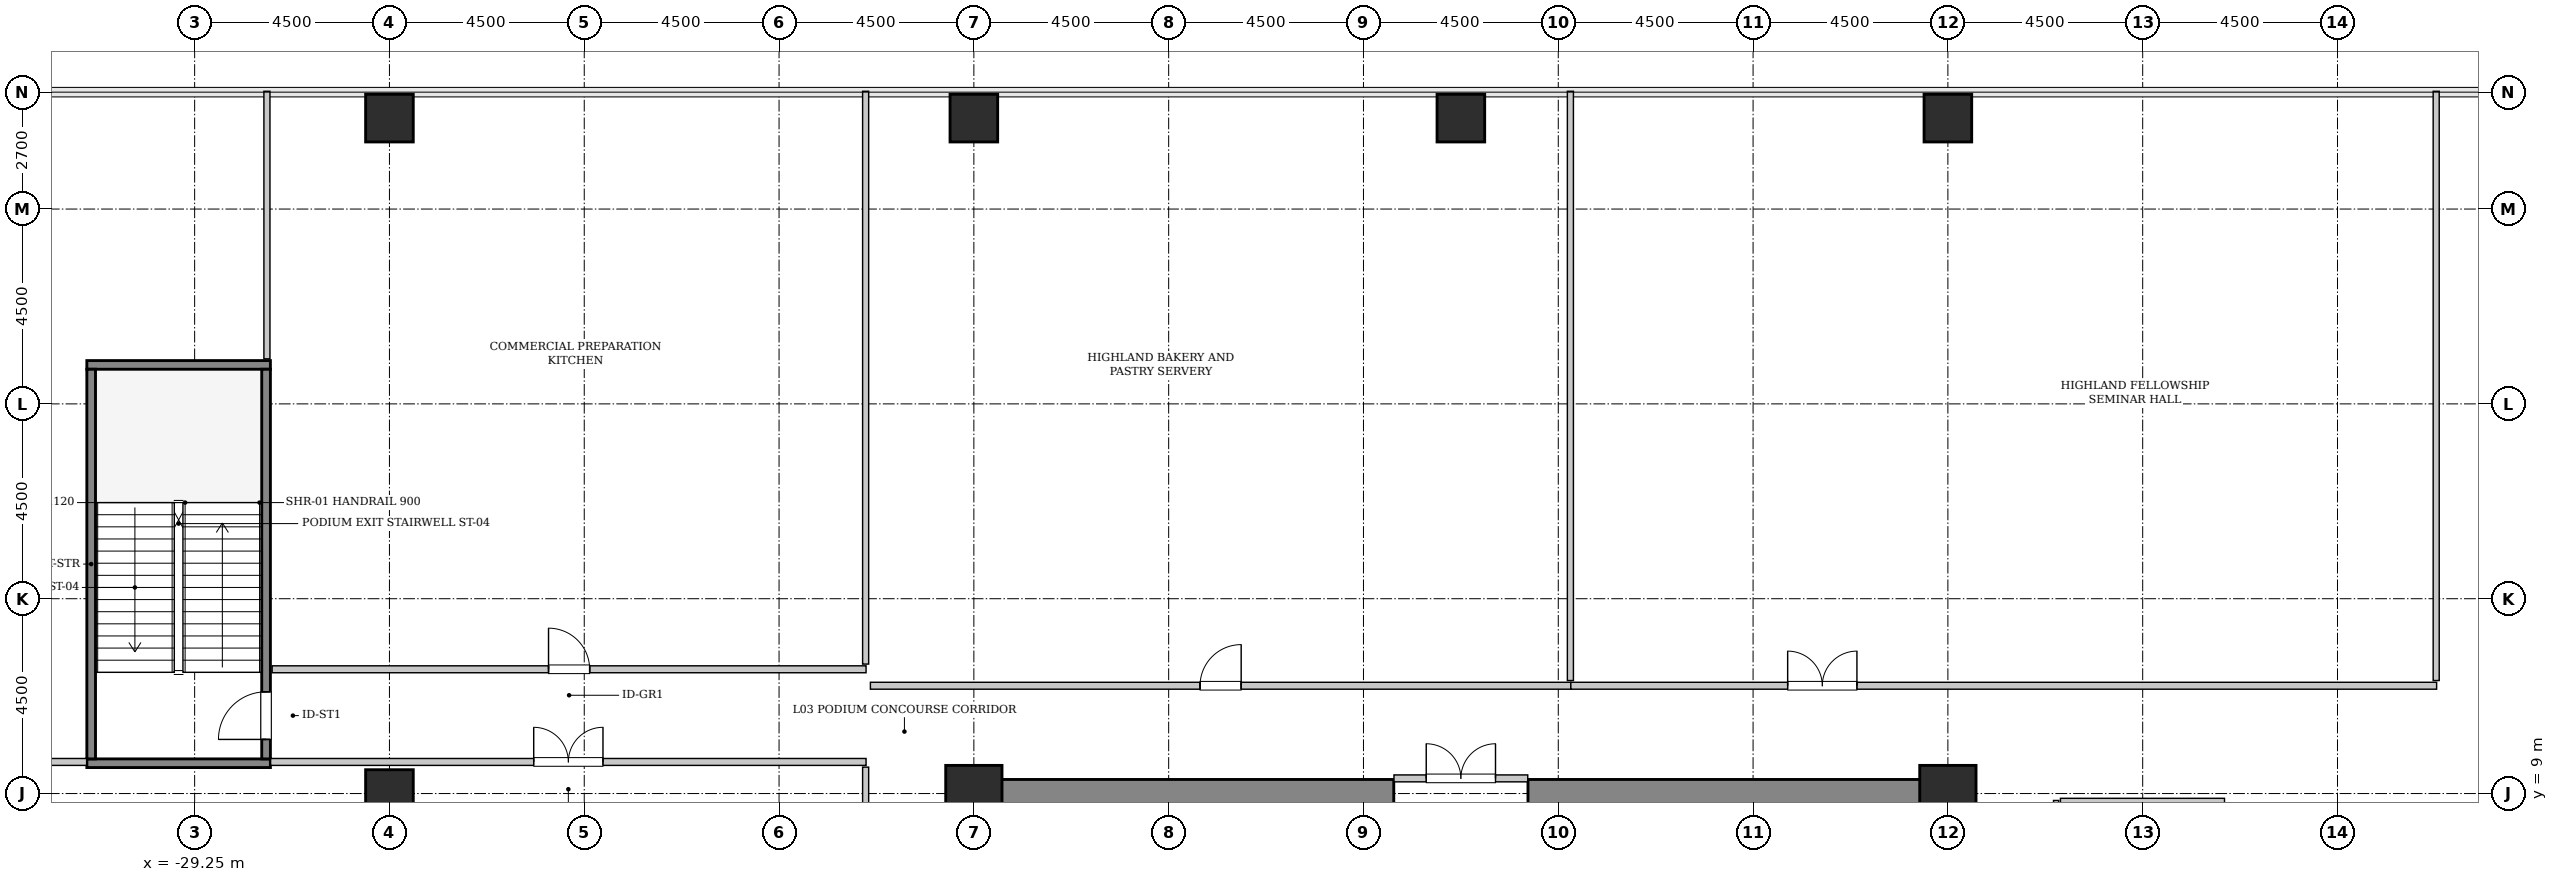
"""IFC4 building model, lengths in metres.
Left out: names, types, materials, properties, quantities, classifications, styles, units other than length and angle.
Written with IfcOpenShell. Run it as: python <this file> out.ifc"""

import sys

from ifc_helpers import new_model, si_unit, direction, frame, frame_2d, origin, origin_2d, place, context, subcontext, project, spatial, rectangle, hollow_rectangle, extrude, source, transform, mapped, element, fill, save


model = new_model("IFC4")
c1 = context("Model", 3, precision=1e-05, world=origin(), true_north=direction((0.0, 1.0)))
c2 = subcontext(c1, "Body", "Model", "MODEL_VIEW")
j1 = project(units=[si_unit("LENGTHUNIT", "METRE"), si_unit("PLANEANGLEUNIT", "RADIAN")], contexts=[c1])
p1 = place(None, origin())
s1 = spatial("IfcSite", under=j1, at=p1, CompositionType="ELEMENT")
p2 = place(p1, origin())
s2 = spatial("IfcBuilding", under=s1, at=p2, CompositionType="ELEMENT")
p3 = place(p2, frame((0.0, 0.0, 16.8)))
s3 = spatial("IfcBuildingStorey", under=s2, at=p3, CompositionType="ELEMENT", Elevation=16.8)
m1 = source(origin(), c2, "Body", "SweptSolid", [
    extrude(rectangle(XDim=10.025, YDim=0.65, at=frame_2d((5.012, 0.0))), origin(), (0.0, 0.0, 1.0), 5.4),
])
for number, where, z_axis, x_axis in (
    (1, (-11.575, 9.0, 0.0), (0.0, 0.0, 1.0), (1.0, 0.0, 0.0)),
    (2, (1.55, 9.0, 0.0), (0.0, 0.0, 1.0), (1.0, 0.0, 0.0)),
):
    element("IfcWall", number, at=place(p3, frame(where, z_axis=z_axis, x_axis=x_axis)), inside=s3, PredefinedType="SHEAR", context=c2, shape_type="MappedRepresentation", body=[
        mapped(m1, transform((0.0, 0.0, 0.0), x_axis=(1.0, 0.0, 0.0), y_axis=(0.0, 1.0, 0.0), z_axis=(0.0, 0.0, 1.0), scale=1.0)),
    ])
m2 = source(origin(), c2, "Body", "SweptSolid", [
    extrude(hollow_rectangle(XDim=1.1, YDim=1.1, WallThickness=0.055, InnerFilletRadius=0.055, OuterFilletRadius=0.11, at=origin_2d()), origin(), (0.0, 0.0, 1.0), 5.4),
])
p4 = place(p3, frame((-24.75, 9.0, 0.0), z_axis=(0.0, 0.0, 1.0), x_axis=(1.0, 0.0, 0.0)))
e3 = element("IfcColumn", 3, at=p4, inside=s3, PredefinedType="COLUMN", context=c2, shape_type="MappedRepresentation", body=[
    mapped(m2, transform((0.0, 0.0, 0.0), x_axis=(1.0, 0.0, 0.0), y_axis=(0.0, 1.0, 0.0), z_axis=(0.0, 0.0, 1.0), scale=1.0)),
])
m3 = source(origin(), c2, "Body", "SweptSolid", [
    extrude(hollow_rectangle(XDim=1.1, YDim=1.1, WallThickness=0.055, InnerFilletRadius=0.055, OuterFilletRadius=0.11, at=origin_2d()), origin(), (0.0, 0.0, 1.0), 5.4),
])
p5 = place(p3, frame((-24.75, 24.6, 0.0), z_axis=(0.0, 0.0, 1.0), x_axis=(1.0, 0.0, 0.0)))
e4 = element("IfcColumn", 4, at=p5, inside=s3, PredefinedType="COLUMN", context=c2, shape_type="MappedRepresentation", body=[
    mapped(m3, transform((0.0, 0.0, 0.0), x_axis=(1.0, 0.0, 0.0), y_axis=(0.0, 1.0, 0.0), z_axis=(0.0, 0.0, 1.0), scale=1.0)),
])
m4 = source(origin(), c2, "Body", "SweptSolid", [
    extrude(hollow_rectangle(XDim=1.3, YDim=1.3, WallThickness=0.065, InnerFilletRadius=0.065, OuterFilletRadius=0.13, at=origin_2d()), origin(), (0.0, 0.0, 1.0), 5.4),
])
p6 = place(p3, frame((-11.25, 9.0, 0.0), z_axis=(0.0, 0.0, 1.0), x_axis=(1.0, 0.0, 0.0)))
e5 = element("IfcColumn", 5, at=p6, inside=s3, PredefinedType="COLUMN", context=c2, shape_type="MappedRepresentation", body=[
    mapped(m4, transform((0.0, 0.0, 0.0), x_axis=(1.0, 0.0, 0.0), y_axis=(0.0, 1.0, 0.0), z_axis=(0.0, 0.0, 1.0), scale=1.0)),
])
for number, where, z_axis, x_axis in (
    (6, (-11.25, 24.6, 0.0), (0.0, 0.0, 1.0), (1.0, 0.0, 0.0)),
    (7, (0.0, 24.6, 0.0), (0.0, 0.0, 1.0), (1.0, 0.0, 0.0)),
):
    element("IfcColumn", number, at=place(p3, frame(where, z_axis=z_axis, x_axis=x_axis)), inside=s3, PredefinedType="COLUMN", context=c2, shape_type="MappedRepresentation", body=[
        mapped(m3, transform((0.0, 0.0, 0.0), x_axis=(1.0, 0.0, 0.0), y_axis=(0.0, 1.0, 0.0), z_axis=(0.0, 0.0, 1.0), scale=1.0)),
    ])
p7 = place(p3, frame((11.25, 9.0, 0.0), z_axis=(0.0, 0.0, 1.0), x_axis=(1.0, 0.0, 0.0)))
e8 = element("IfcColumn", 8, at=p7, inside=s3, PredefinedType="COLUMN", context=c2, shape_type="MappedRepresentation", body=[
    mapped(m4, transform((0.0, 0.0, 0.0), x_axis=(1.0, 0.0, 0.0), y_axis=(0.0, 1.0, 0.0), z_axis=(0.0, 0.0, 1.0), scale=1.0)),
])
p8 = place(p3, frame((11.25, 24.6, 0.0), z_axis=(0.0, 0.0, 1.0), x_axis=(1.0, 0.0, 0.0)))
e9 = element("IfcColumn", 9, at=p8, inside=s3, PredefinedType="COLUMN", context=c2, shape_type="MappedRepresentation", body=[
    mapped(m3, transform((0.0, 0.0, 0.0), x_axis=(1.0, 0.0, 0.0), y_axis=(0.0, 1.0, 0.0), z_axis=(0.0, 0.0, 1.0), scale=1.0)),
])
m5 = source(origin(), c2, "Body", "SweptSolid", [
    extrude(rectangle(XDim=4.24, YDim=0.2, at=frame_2d((2.12, 0.0))), origin(), (0.0, 0.0, 1.0), 5.4),
])
for number, where, z_axis, x_axis in (
    (10, (-27.5, 9.7, 0.0), (0.0, 0.0, 1.0), (-1.0, 0.0, 0.0)),
    (11, (-27.5, 18.9, 0.0), (0.0, 0.0, 1.0), (-1.0, 0.0, 0.0)),
):
    element("IfcWall", number, at=place(p3, frame(where, z_axis=z_axis, x_axis=x_axis)), inside=s3, PredefinedType="SOLIDWALL", context=c2, shape_type="MappedRepresentation", body=[
        mapped(m5, transform((0.0, 0.0, 0.0), x_axis=(1.0, 0.0, 0.0), y_axis=(0.0, 1.0, 0.0), z_axis=(0.0, 0.0, 1.0), scale=1.0)),
    ])
m6 = source(origin(), c2, "Body", "SweptSolid", [
    extrude(rectangle(XDim=9.0, YDim=0.2, at=frame_2d((4.5, 0.0))), origin(), (0.0, 0.0, 1.0), 5.4),
])
p9 = place(p3, frame((-27.6, 9.8, 0.0), z_axis=(0.0, 0.0, 1.0), x_axis=(0.0, 1.0, 0.0)))
e12 = element("IfcWall", 12, at=p9, inside=s3, PredefinedType="SOLIDWALL", context=c2, shape_type="MappedRepresentation", body=[
    mapped(m6, transform((0.0, 0.0, 0.0), x_axis=(1.0, 0.0, 0.0), y_axis=(0.0, 1.0, 0.0), z_axis=(0.0, 0.0, 1.0), scale=1.0)),
])
p10 = place(p9, frame((0.45, 0.0, 0.0)))
e13 = element("IfcOpeningElement", 13, at=p10, cuts=e12, PredefinedType="OPENING", context=c2, shape_type="SweptSolid", body=[
    extrude(rectangle(XDim=1.1, YDim=2.15, at=frame_2d((0.55, 1.075))), frame((0.0, 0.11, 0.0), z_axis=(0.0, -1.0, 0.0), x_axis=(1.0, 0.0, 0.0)), (0.0, 0.0, 1.0), 0.22),
])
p11 = place(p3, frame((-31.64, 9.8, 0.0), z_axis=(0.0, 0.0, 1.0), x_axis=(0.0, 1.0, 0.0)))
e14 = element("IfcWall", 14, at=p11, inside=s3, PredefinedType="SOLIDWALL", context=c2, shape_type="MappedRepresentation", body=[
    mapped(m6, transform((0.0, 0.0, 0.0), x_axis=(1.0, 0.0, 0.0), y_axis=(0.0, 1.0, 0.0), z_axis=(0.0, 0.0, 1.0), scale=1.0)),
])
m7 = source(origin(), c2, "Body", "SweptSolid", [
    extrude(rectangle(XDim=3.09, YDim=0.16, at=frame_2d((1.545, 0.0))), origin(), (0.0, 0.0, 1.0), 3.975),
])
p12 = place(p3, frame((-1.545, 9.35, 0.0), z_axis=(0.0, 0.0, 1.0), x_axis=(1.0, 0.0, 0.0)))
e15 = element("IfcWall", 15, at=p12, inside=s3, PredefinedType="PARTITIONING", context=c2, shape_type="MappedRepresentation", body=[
    mapped(m7, transform((0.0, 0.0, 0.0), x_axis=(1.0, 0.0, 0.0), y_axis=(0.0, 1.0, 0.0), z_axis=(0.0, 0.0, 1.0), scale=1.0)),
])
p13 = place(p12, frame((0.745, 0.0, 0.0)))
e16 = element("IfcOpeningElement", 16, at=p13, cuts=e15, PredefinedType="OPENING", context=c2, shape_type="SweptSolid", body=[
    extrude(rectangle(XDim=1.6, YDim=2.3, at=frame_2d((0.8, 1.15))), frame((0.0, 0.09, 0.0), z_axis=(0.0, -1.0, 0.0), x_axis=(1.0, 0.0, 0.0)), (0.0, 0.0, 1.0), 0.18),
])
m8 = source(origin(), c2, "Body", "SweptSolid", [
    extrude(rectangle(XDim=3.68, YDim=0.12, at=frame_2d((1.84, 0.0))), origin(), (0.0, 0.0, 1.0), 5.085),
])
p14 = place(p3, frame((13.75, 5.16, 0.0), z_axis=(0.0, 0.0, 1.0), x_axis=(0.0, 1.0, 0.0)))
e17 = element("IfcWall", 17, at=p14, inside=s3, PredefinedType="PLUMBINGWALL", context=c2, shape_type="MappedRepresentation", body=[
    mapped(m8, transform((0.0, 0.0, 0.0), x_axis=(1.0, 0.0, 0.0), y_axis=(0.0, 1.0, 0.0), z_axis=(0.0, 0.0, 1.0), scale=1.0)),
])
p15 = place(p14, frame((1.415, 0.0, 0.0)))
e18 = element("IfcOpeningElement", 18, at=p15, cuts=e17, PredefinedType="OPENING", context=c2, shape_type="SweptSolid", body=[
    extrude(rectangle(XDim=0.85, YDim=2.1, at=frame_2d((0.425, 1.05))), frame((0.0, 0.07, 0.0), z_axis=(0.0, -1.0, 0.0), x_axis=(1.0, 0.0, 0.0)), (0.0, 0.0, 1.0), 0.14),
])
m9 = source(origin(), c2, "Body", "SweptSolid", [
    extrude(rectangle(XDim=3.79, YDim=0.12, at=frame_2d((1.895, 0.0))), origin(), (0.0, 0.0, 1.0), 4.075),
])
p16 = place(p3, frame((13.85, 8.83, 0.0), z_axis=(0.0, 0.0, 1.0), x_axis=(1.0, 0.0, 0.0)))
e19 = element("IfcWall", 19, at=p16, inside=s3, PredefinedType="PLUMBINGWALL", context=c2, shape_type="MappedRepresentation", body=[
    mapped(m9, transform((0.0, 0.0, 0.0), x_axis=(1.0, 0.0, 0.0), y_axis=(0.0, 1.0, 0.0), z_axis=(0.0, 0.0, 1.0), scale=1.0)),
])
m10 = source(origin(), c2, "Body", "SweptSolid", [
    extrude(rectangle(XDim=13.755, YDim=0.16, at=frame_2d((6.877, 0.0))), origin(), (0.0, 0.0, 1.0), 5.085),
])
p17 = place(p3, frame((-27.495, 9.73, 0.0), z_axis=(0.0, 0.0, 1.0), x_axis=(1.0, 0.0, 0.0)))
e20 = element("IfcWall", 20, at=p17, inside=s3, PredefinedType="PARTITIONING", context=c2, shape_type="MappedRepresentation", body=[
    mapped(m10, transform((0.0, 0.0, 0.0), x_axis=(1.0, 0.0, 0.0), y_axis=(0.0, 1.0, 0.0), z_axis=(0.0, 0.0, 1.0), scale=1.0)),
])
p18 = place(p17, frame((6.077, 0.0, 0.0)))
e21 = element("IfcOpeningElement", 21, at=p18, cuts=e20, PredefinedType="OPENING", context=c2, shape_type="SweptSolid", body=[
    extrude(rectangle(XDim=1.6, YDim=2.3, at=frame_2d((0.8, 1.15))), frame((0.0, 0.09, 0.0), z_axis=(0.0, -1.0, 0.0), x_axis=(1.0, 0.0, 0.0)), (0.0, 0.0, 1.0), 0.18),
])
m11 = source(origin(), c2, "Body", "SweptSolid", [
    extrude(rectangle(XDim=6.525, YDim=0.16, at=frame_2d((3.262, 0.0))), origin(), (0.0, 0.0, 1.0), 5.085),
])
p19 = place(p3, frame((-38.27, 9.73, 0.0), z_axis=(0.0, 0.0, 1.0), x_axis=(1.0, 0.0, 0.0)))
e22 = element("IfcWall", 22, at=p19, inside=s3, PredefinedType="PARTITIONING", context=c2, shape_type="MappedRepresentation", body=[
    mapped(m11, transform((0.0, 0.0, 0.0), x_axis=(1.0, 0.0, 0.0), y_axis=(0.0, 1.0, 0.0), z_axis=(0.0, 0.0, 1.0), scale=1.0)),
])
m12 = source(origin(), c2, "Body", "SweptSolid", [
    extrude(rectangle(XDim=9.6, YDim=0.14, at=frame_2d((4.8, 0.0))), origin(), (0.0, 0.0, 1.0), 5.085),
])
p20 = place(p3, frame((-13.75, 0.01, 0.0), z_axis=(0.0, 0.0, 1.0), x_axis=(0.0, 1.0, 0.0)))
e23 = element("IfcWall", 23, at=p20, inside=s3, PredefinedType="PARTITIONING", context=c2, shape_type="MappedRepresentation", body=[
    mapped(m12, transform((0.0, 0.0, 0.0), x_axis=(1.0, 0.0, 0.0), y_axis=(0.0, 1.0, 0.0), z_axis=(0.0, 0.0, 1.0), scale=1.0)),
])
m13 = source(origin(), c2, "Body", "SweptSolid", [
    extrude(rectangle(XDim=13.72, YDim=0.16, at=frame_2d((6.86, 0.0))), origin(), (0.0, 0.0, 1.0), 5.085),
])
p21 = place(p3, frame((-27.46, 11.87, 0.0), z_axis=(0.0, 0.0, 1.0), x_axis=(1.0, 0.0, 0.0)))
e24 = element("IfcWall", 24, at=p21, inside=s3, PredefinedType="PARTITIONING", context=c2, shape_type="MappedRepresentation", body=[
    mapped(m13, transform((0.0, 0.0, 0.0), x_axis=(1.0, 0.0, 0.0), y_axis=(0.0, 1.0, 0.0), z_axis=(0.0, 0.0, 1.0), scale=1.0)),
])
p22 = place(p21, frame((6.385, 0.0, 0.0)))
e25 = element("IfcOpeningElement", 25, at=p22, cuts=e24, PredefinedType="OPENING", context=c2, shape_type="SweptSolid", body=[
    extrude(rectangle(XDim=0.95, YDim=2.1, at=frame_2d((0.475, 1.05))), frame((0.0, 0.09, 0.0), z_axis=(0.0, -1.0, 0.0), x_axis=(1.0, 0.0, 0.0)), (0.0, 0.0, 1.0), 0.18),
])
m14 = source(origin(), c2, "Body", "SweptSolid", [
    extrude(rectangle(XDim=6.18, YDim=0.14, at=frame_2d((3.09, 0.0))), origin(), (0.0, 0.0, 1.0), 5.085),
])
p23 = place(p3, frame((-27.58, 19.04, 0.0), z_axis=(0.0, 0.0, 1.0), x_axis=(0.0, 1.0, 0.0)))
e26 = element("IfcWall", 26, at=p23, inside=s3, PredefinedType="PARTITIONING", context=c2, shape_type="MappedRepresentation", body=[
    mapped(m14, transform((0.0, 0.0, 0.0), x_axis=(1.0, 0.0, 0.0), y_axis=(0.0, 1.0, 0.0), z_axis=(0.0, 0.0, 1.0), scale=1.0)),
])
m15 = source(origin(), c2, "Body", "SweptSolid", [
    extrude(rectangle(XDim=13.23, YDim=0.14, at=frame_2d((6.615, 0.0))), origin(), (0.0, 0.0, 1.0), 5.085),
])
p24 = place(p3, frame((-13.75, 11.99, 0.0), z_axis=(0.0, 0.0, 1.0), x_axis=(0.0, 1.0, 0.0)))
e27 = element("IfcWall", 27, at=p24, inside=s3, PredefinedType="PARTITIONING", context=c2, shape_type="MappedRepresentation", body=[
    mapped(m15, transform((0.0, 0.0, 0.0), x_axis=(1.0, 0.0, 0.0), y_axis=(0.0, 1.0, 0.0), z_axis=(0.0, 0.0, 1.0), scale=1.0)),
])
m16 = source(origin(), c2, "Body", "SweptSolid", [
    extrude(rectangle(XDim=16.18, YDim=0.16, at=frame_2d((8.09, 0.0))), origin(), (0.0, 0.0, 1.0), 5.085),
])
p25 = place(p3, frame((-13.64, 11.49, 0.0), z_axis=(0.0, 0.0, 1.0), x_axis=(1.0, 0.0, 0.0)))
e28 = element("IfcWall", 28, at=p25, inside=s3, PredefinedType="PARTITIONING", context=c2, shape_type="MappedRepresentation", body=[
    mapped(m16, transform((0.0, 0.0, 0.0), x_axis=(1.0, 0.0, 0.0), y_axis=(0.0, 1.0, 0.0), z_axis=(0.0, 0.0, 1.0), scale=1.0)),
])
p26 = place(p25, frame((7.615, 0.0, 0.0)))
e29 = element("IfcOpeningElement", 29, at=p26, cuts=e28, PredefinedType="OPENING", context=c2, shape_type="SweptSolid", body=[
    extrude(rectangle(XDim=0.95, YDim=2.1, at=frame_2d((0.475, 1.05))), frame((0.0, 0.09, 0.0), z_axis=(0.0, -1.0, 0.0), x_axis=(1.0, 0.0, 0.0)), (0.0, 0.0, 1.0), 0.18),
])
m17 = source(origin(), c2, "Body", "SweptSolid", [
    extrude(rectangle(XDim=13.61, YDim=0.14, at=frame_2d((6.805, 0.0))), origin(), (0.0, 0.0, 1.0), 5.085),
])
p27 = place(p3, frame((2.53, 11.61, 0.0), z_axis=(0.0, 0.0, 1.0), x_axis=(0.0, 1.0, 0.0)))
e30 = element("IfcWall", 30, at=p27, inside=s3, PredefinedType="PARTITIONING", context=c2, shape_type="MappedRepresentation", body=[
    mapped(m17, transform((0.0, 0.0, 0.0), x_axis=(1.0, 0.0, 0.0), y_axis=(0.0, 1.0, 0.0), z_axis=(0.0, 0.0, 1.0), scale=1.0)),
])
m18 = source(origin(), c2, "Body", "SweptSolid", [
    extrude(rectangle(XDim=20.0, YDim=0.16, at=frame_2d((10.0, 0.0))), origin(), (0.0, 0.0, 1.0), 5.085),
])
p28 = place(p3, frame((2.54, 11.49, 0.0), z_axis=(0.0, 0.0, 1.0), x_axis=(1.0, 0.0, 0.0)))
e31 = element("IfcWall", 31, at=p28, inside=s3, PredefinedType="PARTITIONING", context=c2, shape_type="MappedRepresentation", body=[
    mapped(m18, transform((0.0, 0.0, 0.0), x_axis=(1.0, 0.0, 0.0), y_axis=(0.0, 1.0, 0.0), z_axis=(0.0, 0.0, 1.0), scale=1.0)),
])
p29 = place(p28, frame((5.009, 0.0, 0.0)))
e32 = element("IfcOpeningElement", 32, at=p29, cuts=e31, PredefinedType="OPENING", context=c2, shape_type="SweptSolid", body=[
    extrude(rectangle(XDim=1.6, YDim=2.3, at=frame_2d((0.8, 1.15))), frame((0.0, 0.09, 0.0), z_axis=(0.0, -1.0, 0.0), x_axis=(1.0, 0.0, 0.0)), (0.0, 0.0, 1.0), 0.18),
])
p30 = place(p3, frame((22.53, 11.61, 0.0), z_axis=(0.0, 0.0, 1.0), x_axis=(0.0, 1.0, 0.0)))
e33 = element("IfcWall", 33, at=p30, inside=s3, PredefinedType="PARTITIONING", context=c2, shape_type="MappedRepresentation", body=[
    mapped(m17, transform((0.0, 0.0, 0.0), x_axis=(1.0, 0.0, 0.0), y_axis=(0.0, 1.0, 0.0), z_axis=(0.0, 0.0, 1.0), scale=1.0)),
])
m19 = source(origin(), c2, "Body", "SweptSolid", [
    extrude(rectangle(XDim=1.1, YDim=2.15, at=frame_2d((0.55, 1.075))), frame((0.0, 0.025, 0.0), z_axis=(0.0, -1.0, 0.0), x_axis=(1.0, 0.0, 0.0)), (0.0, 0.0, 1.0), 0.05),
])
p31 = place(p10, origin())
e34 = element("IfcDoor", 34, at=p31, inside=s3, OperationType="SINGLE_SWING_LEFT", PredefinedType="DOOR", context=c2, shape_type="MappedRepresentation", body=[
    mapped(m19, transform((0.0, 0.0, 0.0), x_axis=(1.0, 0.0, 0.0), y_axis=(0.0, 1.0, 0.0), z_axis=(0.0, 0.0, 1.0), scale=1.0)),
])
fill(e13, e34)
m20 = source(origin(), c2, "Body", "SweptSolid", [
    extrude(rectangle(XDim=1.6, YDim=2.3, at=frame_2d((0.8, 1.15))), frame((0.0, 0.025, 0.0), z_axis=(0.0, -1.0, 0.0), x_axis=(1.0, 0.0, 0.0)), (0.0, 0.0, 1.0), 0.05),
])
p32 = place(p13, origin())
e35 = element("IfcDoor", 35, at=p32, inside=s3, OperationType="DOUBLE_DOOR_SINGLE_SWING", PredefinedType="DOOR", context=c2, shape_type="MappedRepresentation", body=[
    mapped(m20, transform((0.0, 0.0, 0.0), x_axis=(1.0, 0.0, 0.0), y_axis=(0.0, 1.0, 0.0), z_axis=(0.0, 0.0, 1.0), scale=1.0)),
])
fill(e16, e35)
p33 = place(p18, origin())
e36 = element("IfcDoor", 36, at=p33, inside=s3, OperationType="DOUBLE_DOOR_SINGLE_SWING", PredefinedType="DOOR", context=c2, shape_type="MappedRepresentation", body=[
    mapped(m20, transform((0.0, 0.0, 0.0), x_axis=(1.0, 0.0, 0.0), y_axis=(0.0, 1.0, 0.0), z_axis=(0.0, 0.0, 1.0), scale=1.0)),
])
fill(e21, e36)
m21 = source(origin(), c2, "Body", "SweptSolid", [
    extrude(rectangle(XDim=0.95, YDim=2.1, at=frame_2d((0.475, 1.05))), frame((0.0, 0.025, 0.0), z_axis=(0.0, -1.0, 0.0), x_axis=(1.0, 0.0, 0.0)), (0.0, 0.0, 1.0), 0.05),
])
p34 = place(p22, origin())
e37 = element("IfcDoor", 37, at=p34, inside=s3, OperationType="SINGLE_SWING_LEFT", PredefinedType="DOOR", context=c2, shape_type="MappedRepresentation", body=[
    mapped(m21, transform((0.0, 0.0, 0.0), x_axis=(1.0, 0.0, 0.0), y_axis=(0.0, 1.0, 0.0), z_axis=(0.0, 0.0, 1.0), scale=1.0)),
])
fill(e25, e37)
p35 = place(p26, origin())
e38 = element("IfcDoor", 38, at=p35, inside=s3, OperationType="SINGLE_SWING_RIGHT", PredefinedType="DOOR", context=c2, shape_type="MappedRepresentation", body=[
    mapped(m21, transform((0.0, 0.0, 0.0), x_axis=(1.0, 0.0, 0.0), y_axis=(0.0, 1.0, 0.0), z_axis=(0.0, 0.0, 1.0), scale=1.0)),
])
fill(e29, e38)
p36 = place(p29, origin())
e39 = element("IfcDoor", 39, at=p36, inside=s3, OperationType="DOUBLE_DOOR_SINGLE_SWING", PredefinedType="DOOR", context=c2, shape_type="MappedRepresentation", body=[
    mapped(m20, transform((0.0, 0.0, 0.0), x_axis=(1.0, 0.0, 0.0), y_axis=(0.0, 1.0, 0.0), z_axis=(0.0, 0.0, 1.0), scale=1.0)),
])
fill(e32, e39)
save(model, sys.argv[1])
